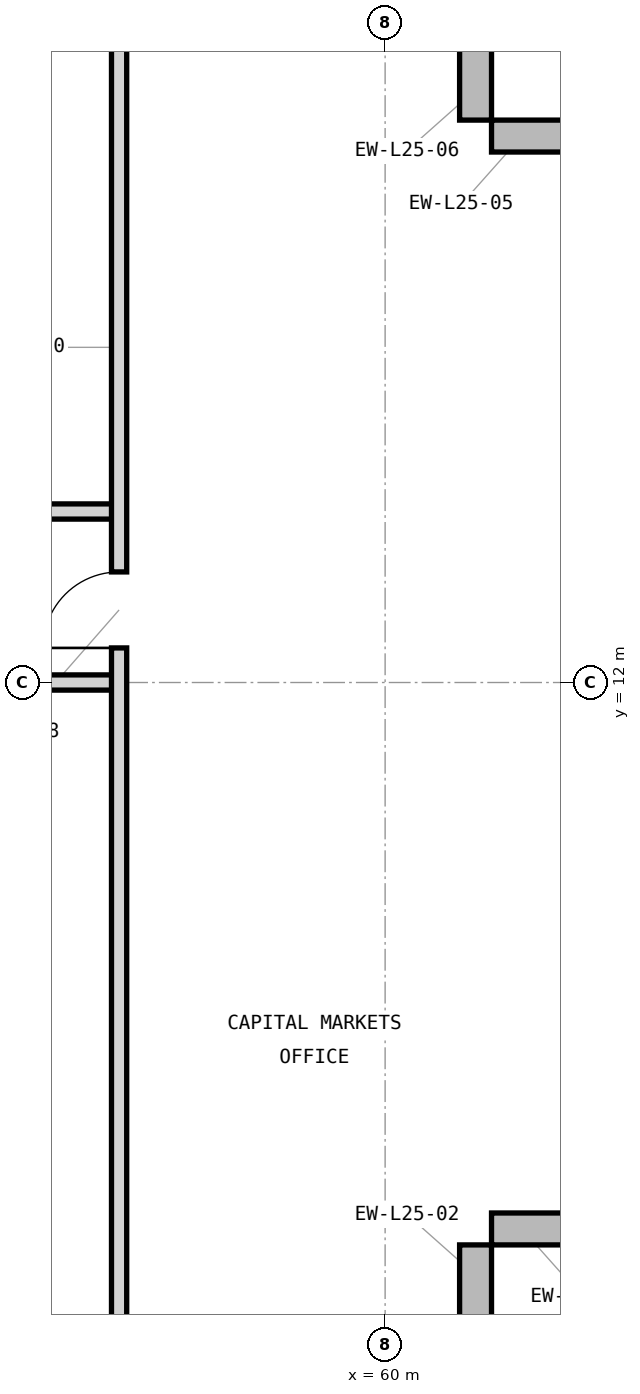
"""IFC4 building model, lengths in metres.
Left out: names, types, materials, properties, quantities, classifications, styles, units other than length and angle.
Written with IfcOpenShell. Run it as: python <this file> out.ifc"""

import sys

from ifc_helpers import new_model, si_unit, direction, frame, frame_2d, origin, place, context, subcontext, project, spatial, rectangle, extrude, element, fill, save


model = new_model("IFC4")
c1 = context("Model", 3, precision=1e-05, world=origin(), true_north=direction((0.0, 1.0)))
c2 = subcontext(c1, "Body", "Model", "MODEL_VIEW")
j1 = project(units=[si_unit("LENGTHUNIT", "METRE"), si_unit("PLANEANGLEUNIT", "RADIAN")], contexts=[c1])
p1 = place(None, origin())
s1 = spatial("IfcSite", under=j1, at=p1, CompositionType="ELEMENT")
p2 = place(p1, origin())
s2 = spatial("IfcBuilding", under=s1, at=p2, CompositionType="ELEMENT")
p3 = place(p2, frame((0.0, 0.0, 108.9)))
s3 = spatial("IfcBuildingStorey", under=s2, at=p3, CompositionType="ELEMENT", Elevation=108.9)
for number, where, z_axis, x_axis in (
    (1, (61.19, 3.0, 0.0), (0.0, 0.0, 1.0), (0.0, 1.0, 0.0)),
    (2, (61.4, 4.81, 0.0), (0.0, 0.0, 1.0), (1.0, 0.0, 0.0)),
    (3, (63.0, 19.19, 0.0), (0.0, 0.0, 1.0), (-1.0, 0.0, 0.0)),
    (4, (61.19, 19.4, 0.0), (0.0, 0.0, 1.0), (0.0, 1.0, 0.0)),
):
    element("IfcWall", number, at=place(p3, frame(where, z_axis=z_axis, x_axis=x_axis)), inside=s3, PredefinedType="STANDARD", context=c2, shape_type="SweptSolid", body=[
        extrude(rectangle(XDim=1.6, YDim=0.42, at=frame_2d((0.8, 0.0))), origin(), (0.0, 0.0, 1.0), 3.7),
    ])
p4 = place(p3, frame((49.2, 12.0, 0.0), z_axis=(0.0, 0.0, 1.0), x_axis=(1.0, 0.0, 0.0)))
e5 = element("IfcWall", 5, at=p4, inside=s3, PredefinedType="PARTITIONING", context=c2, shape_type="SweptSolid", body=[
    extrude(rectangle(XDim=7.3, YDim=0.2, at=frame_2d((3.65, 0.0))), origin(), (0.0, 0.0, 1.0), 3.227),
])
p5 = place(p4, frame((3.15, 0.0, 0.0)))
e6 = element("IfcOpeningElement", 6, at=p5, cuts=e5, PredefinedType="OPENING", context=c2, shape_type="SweptSolid", body=[
    extrude(rectangle(XDim=1.0, YDim=2.15, at=frame_2d((0.5, 1.075))), frame((0.0, 0.11, 0.0), z_axis=(0.0, -1.0, 0.0), x_axis=(1.0, 0.0, 0.0)), (0.0, 0.0, 1.0), 0.22),
])
p6 = place(p3, frame((46.2, 14.25, 0.0), z_axis=(0.0, 0.0, 1.0), x_axis=(1.0, 0.0, 0.0)))
e7 = element("IfcWall", 7, at=p6, inside=s3, PredefinedType="PARTITIONING", context=c2, shape_type="SweptSolid", body=[
    extrude(rectangle(XDim=10.3, YDim=0.2, at=frame_2d((5.15, 0.0))), origin(), (0.0, 0.0, 1.0), 3.69),
])
p7 = place(p6, frame((4.65, 0.0, 0.0)))
e8 = element("IfcOpeningElement", 8, at=p7, cuts=e7, PredefinedType="OPENING", context=c2, shape_type="SweptSolid", body=[
    extrude(rectangle(XDim=1.0, YDim=2.15, at=frame_2d((0.5, 1.075))), frame((0.0, 0.11, 0.0), z_axis=(0.0, -1.0, 0.0), x_axis=(1.0, 0.0, 0.0)), (0.0, 0.0, 1.0), 0.22),
])
p8 = place(p3, frame((56.5, 3.18, 0.0), z_axis=(0.0, 0.0, 1.0), x_axis=(0.0, 1.0, 0.0)))
e9 = element("IfcWall", 9, at=p8, inside=s3, PredefinedType="PARTITIONING", context=c2, shape_type="SweptSolid", body=[
    extrude(rectangle(XDim=17.64, YDim=0.2, at=frame_2d((8.82, 0.0))), origin(), (0.0, 0.0, 1.0), 3.69),
])
p9 = place(p8, frame((9.275, 0.0, 0.0)))
e10 = element("IfcOpeningElement", 10, at=p9, cuts=e9, PredefinedType="OPENING", context=c2, shape_type="SweptSolid", body=[
    extrude(rectangle(XDim=1.0, YDim=2.15, at=frame_2d((0.5, 1.075))), frame((0.0, 0.11, 0.0), z_axis=(0.0, -1.0, 0.0), x_axis=(1.0, 0.0, 0.0)), (0.0, 0.0, 1.0), 0.22),
])
p10 = place(p9, origin())
e11 = element("IfcDoor", 11, at=p10, inside=s3, OperationType="SINGLE_SWING_LEFT", PredefinedType="DOOR", context=c2, shape_type="SweptSolid", body=[
    extrude(rectangle(XDim=1.0, YDim=2.15, at=frame_2d((0.5, 1.075))), frame((0.0, 0.025, 0.0), z_axis=(0.0, -1.0, 0.0), x_axis=(1.0, 0.0, 0.0)), (0.0, 0.0, 1.0), 0.05),
])
fill(e10, e11)
save(model, sys.argv[1])
